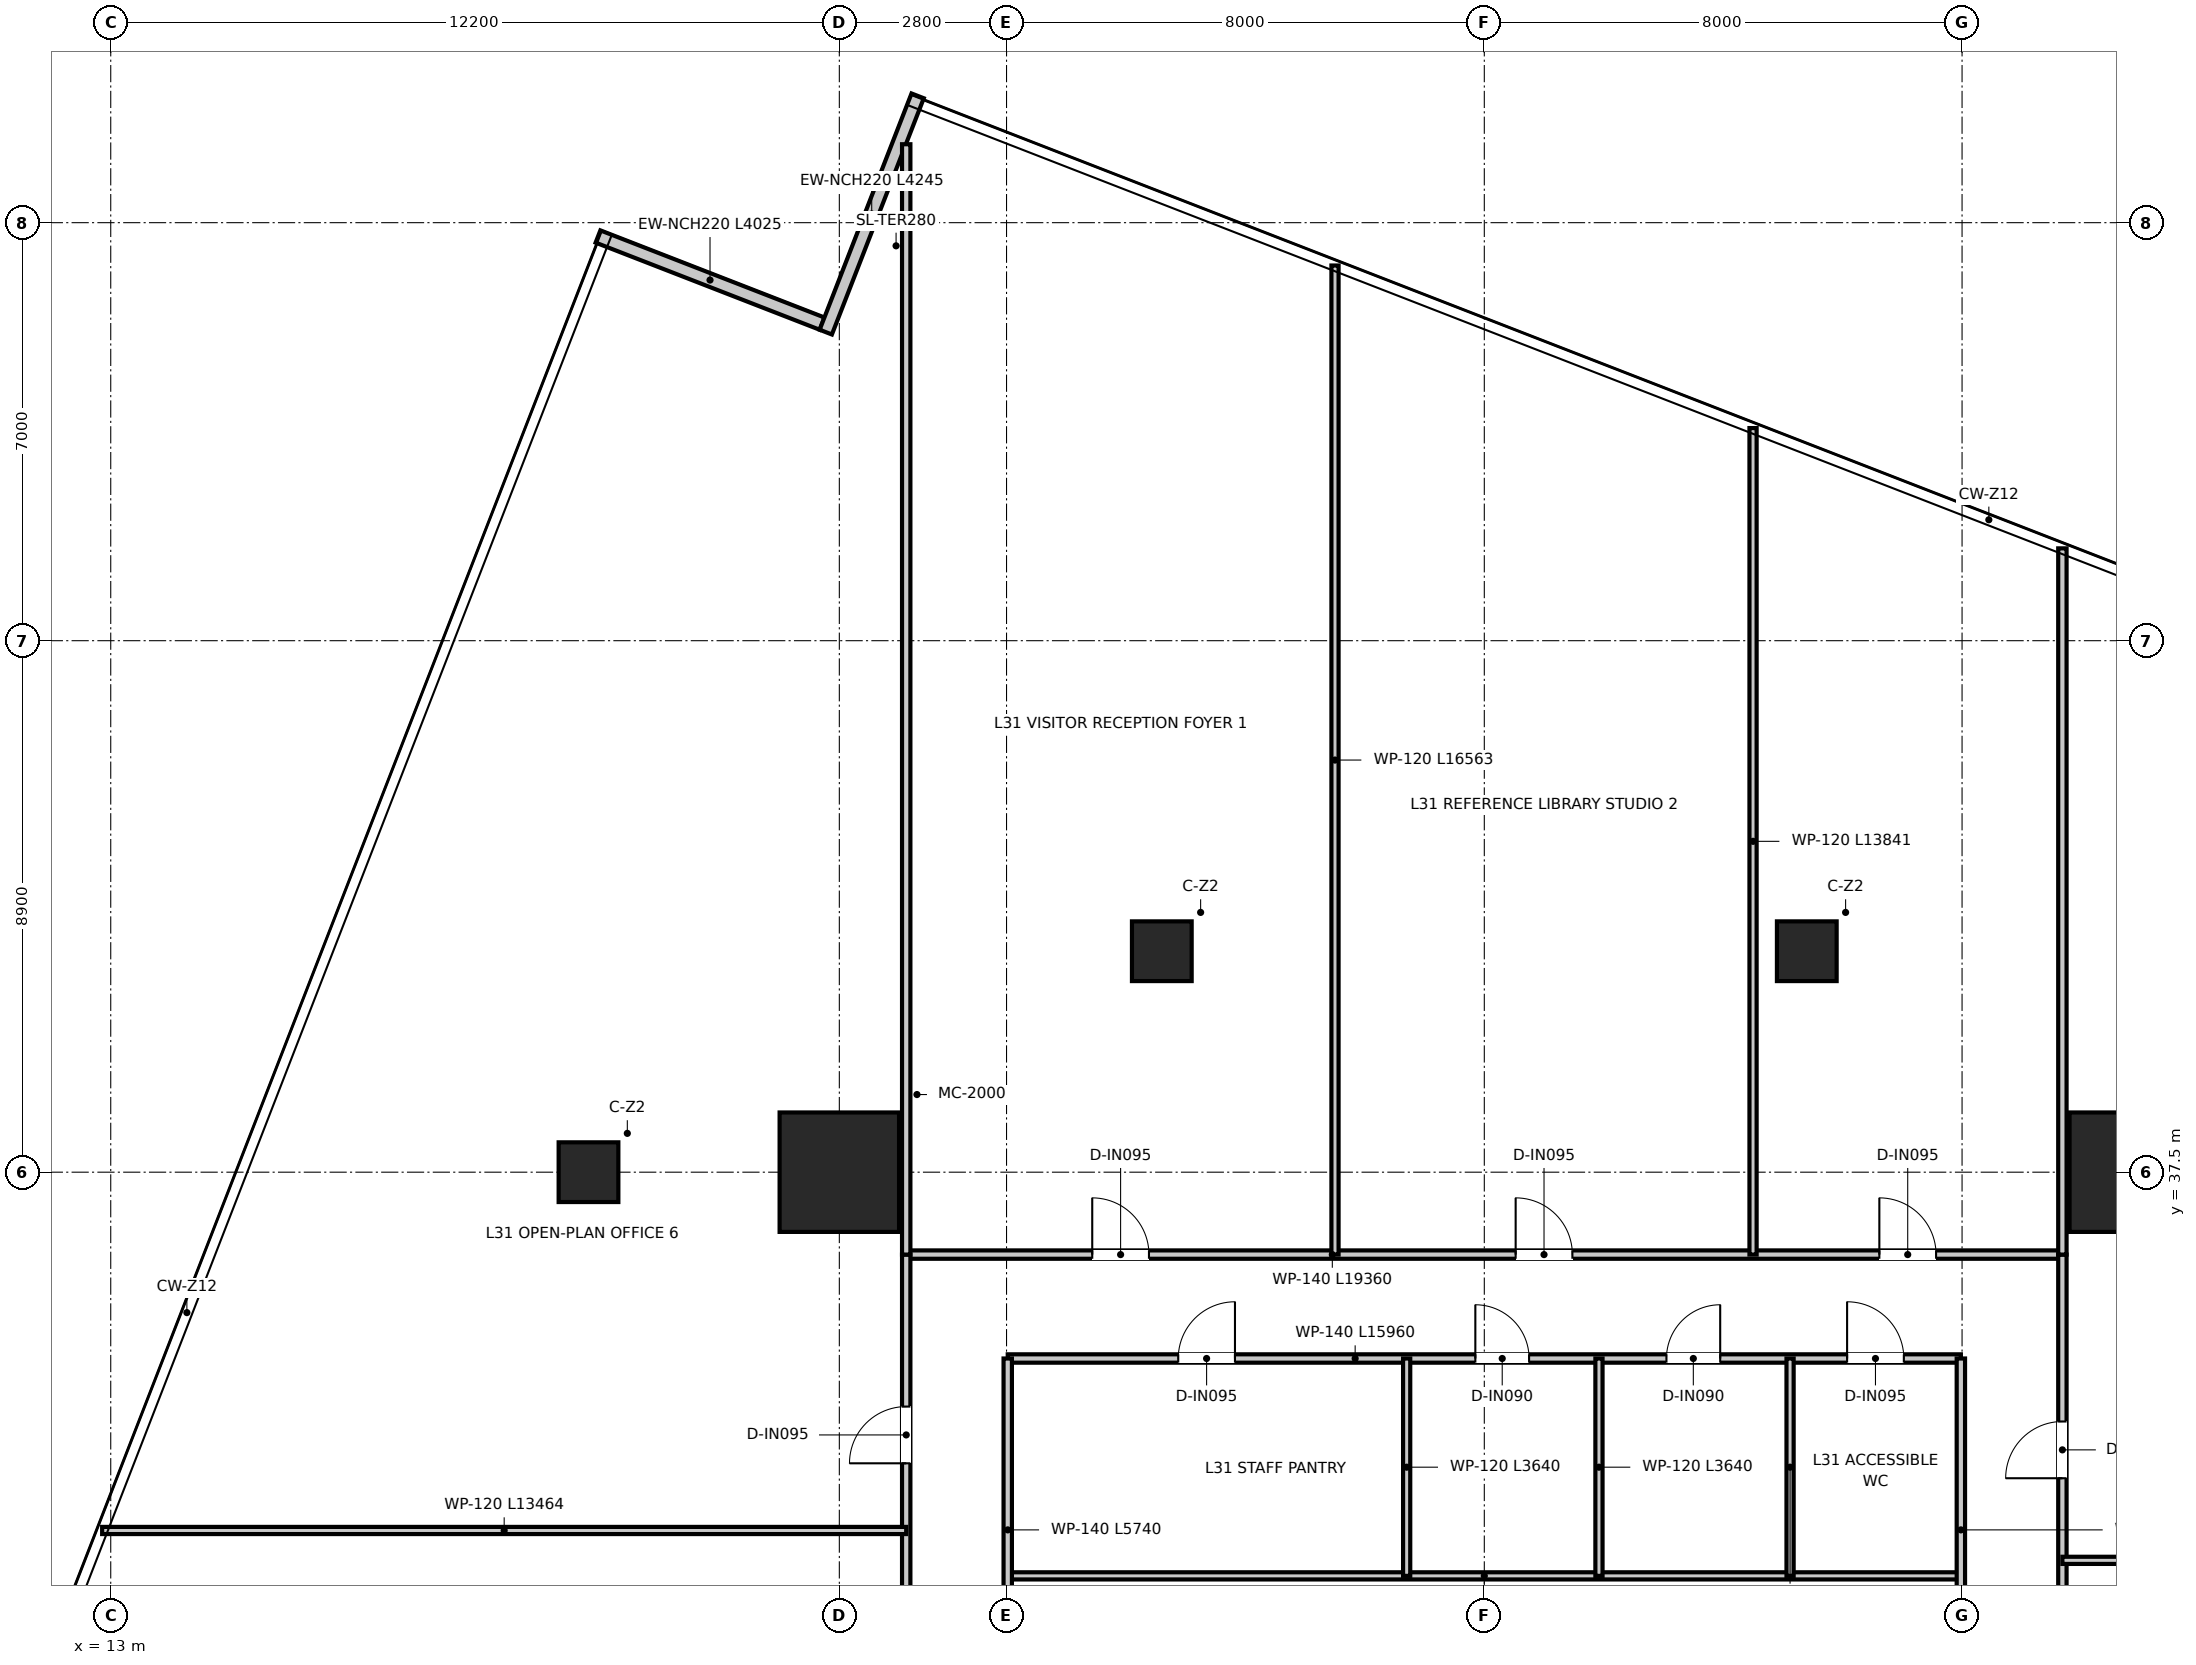
"""IFC4 building model, lengths in metres.
Left out: names, types, materials, properties, quantities, classifications, styles, units other than length and angle.
Written with IfcOpenShell. Run it as: python <this file> out.ifc"""

import sys

from ifc_helpers import new_model, si_unit, direction, frame, frame_2d, origin, origin_2d, place, context, subcontext, project, spatial, rectangle, extrude, source, transform, mapped, element, fill, save


model = new_model("IFC4")
c1 = context("Model", 3, precision=1e-05, world=origin(), true_north=direction((0.0, 1.0)))
c2 = subcontext(c1, "Body", "Model", "MODEL_VIEW")
j1 = project(units=[si_unit("LENGTHUNIT", "METRE"), si_unit("PLANEANGLEUNIT", "RADIAN")], contexts=[c1])
p1 = place(None, origin())
s1 = spatial("IfcSite", under=j1, at=p1, CompositionType="ELEMENT")
p2 = place(p1, origin())
s2 = spatial("IfcBuilding", under=s1, at=p2, CompositionType="ELEMENT")
p3 = place(p2, frame((0.0, 0.0, 129.55)))
s3 = spatial("IfcBuildingStorey", under=s2, at=p3, CompositionType="ELEMENT", Elevation=129.55)
m1 = source(origin(), c2, "Body", "SweptSolid", [
    extrude(rectangle(XDim=2.0, YDim=2.0, at=origin_2d()), origin(), (0.0, 0.0, 1.0), 3.95),
])
for number, where, z_axis, x_axis in (
    (1, (46.8, 37.5, 0.0), (0.0, 0.0, 1.0), (1.0, 0.0, 0.0)),
    (2, (25.2, 37.5, 0.0), (0.0, 0.0, 1.0), (1.0, 0.0, 0.0)),
):
    element("IfcColumn", number, at=place(p3, frame(where, z_axis=z_axis, x_axis=x_axis)), inside=s3, PredefinedType="USERDEFINED", context=c2, shape_type="MappedRepresentation", body=[
        mapped(m1, transform((0.0, 0.0, 0.0), x_axis=(1.0, 0.0, 0.0), y_axis=(0.0, 1.0, 0.0), z_axis=(0.0, 0.0, 1.0), scale=1.0)),
    ])
m2 = source(origin(), c2, "Body", "SweptSolid", [
    extrude(rectangle(XDim=1.0, YDim=1.0, at=origin_2d()), origin(), (0.0, 0.0, 1.0), 3.95),
])
for number, where, z_axis, x_axis in (
    (3, (21.0, 37.5, 0.0), (0.0, 0.0, 1.0), (1.0, 0.0, 0.0)),
    (4, (30.6, 41.2, 0.0), (0.0, 0.0, 1.0), (1.0, 0.0, 0.0)),
    (5, (41.4, 41.2, 0.0), (0.0, 0.0, 1.0), (1.0, 0.0, 0.0)),
):
    element("IfcColumn", number, at=place(p3, frame(where, z_axis=z_axis, x_axis=x_axis)), inside=s3, PredefinedType="COLUMN", context=c2, shape_type="MappedRepresentation", body=[
        mapped(m2, transform((0.0, 0.0, 0.0), x_axis=(1.0, 0.0, 0.0), y_axis=(0.0, 1.0, 0.0), z_axis=(0.0, 0.0, 1.0), scale=1.0)),
    ])
p4 = place(p3, frame((24.91, 51.71, 0.0), z_axis=(0.0, 0.0, 1.0), x_axis=(-0.932010363197, 0.362431625129, 0.0)))
e6 = element("IfcWall", 6, at=p4, inside=s3, PredefinedType="ELEMENTEDWALL", context=c2, shape_type="SweptSolid", body=[
    extrude(rectangle(XDim=4.025, YDim=0.22, at=frame_2d((2.012, 0.0))), origin(), (0.0, 0.0, 1.0), 3.67),
])
p5 = place(p3, frame((26.512, 55.524, 0.0), z_axis=(0.0, 0.0, 1.0), x_axis=(-0.362449036596, -0.932003592198, 0.0)))
e7 = element("IfcWall", 7, at=p5, inside=s3, PredefinedType="ELEMENTEDWALL", context=c2, shape_type="SweptSolid", body=[
    extrude(rectangle(XDim=4.245, YDim=0.22, at=frame_2d((2.123, 0.0))), origin(), (0.0, 0.0, 1.0), 3.67),
])
p6 = place(p3, frame((28.02, 30.74, 0.0), z_axis=(0.0, 0.0, 1.0), x_axis=(1.0, 0.0, 0.0)))
e8 = element("IfcWall", 8, at=p6, inside=s3, PredefinedType="PARTITIONING", context=c2, shape_type="SweptSolid", body=[
    extrude(rectangle(XDim=15.96, YDim=0.12, at=frame_2d((7.98, 0.0))), origin(), (0.0, 0.0, 1.0), 3.08),
])
p7 = place(p3, frame((28.02, 34.38, 0.0), z_axis=(0.0, 0.0, 1.0), x_axis=(1.0, 0.0, 0.0)))
e9 = element("IfcWall", 9, at=p7, inside=s3, PredefinedType="PARTITIONING", context=c2, shape_type="SweptSolid", body=[
    extrude(rectangle(XDim=15.96, YDim=0.14, at=frame_2d((7.98, 0.0))), origin(), (0.0, 0.0, 1.0), 3.08),
])
p8 = place(p7, frame((7.83, 0.0, 0.0)))
e10 = element("IfcOpeningElement", 10, at=p8, cuts=e9, PredefinedType="OPENING", context=c2, shape_type="SweptSolid", body=[
    extrude(rectangle(XDim=0.9, YDim=2.1, at=frame_2d((0.45, 1.05))), frame((0.0, 0.08, 0.0), z_axis=(0.0, -1.0, 0.0), x_axis=(1.0, 0.0, 0.0)), (0.0, 0.0, 1.0), 0.16),
])
p9 = place(p7, frame((11.03, 0.0, 0.0)))
e11 = element("IfcOpeningElement", 11, at=p9, cuts=e9, PredefinedType="OPENING", context=c2, shape_type="SweptSolid", body=[
    extrude(rectangle(XDim=0.9, YDim=2.1, at=frame_2d((0.45, 1.05))), frame((0.0, 0.08, 0.0), z_axis=(0.0, -1.0, 0.0), x_axis=(1.0, 0.0, 0.0)), (0.0, 0.0, 1.0), 0.16),
])
p10 = place(p7, frame((14.055, 0.0, 0.0)))
e12 = element("IfcOpeningElement", 12, at=p10, cuts=e9, PredefinedType="OPENING", context=c2, shape_type="SweptSolid", body=[
    extrude(rectangle(XDim=0.95, YDim=2.1, at=frame_2d((0.475, 1.05))), frame((0.0, 0.08, 0.0), z_axis=(0.0, -1.0, 0.0), x_axis=(1.0, 0.0, 0.0)), (0.0, 0.0, 1.0), 0.16),
])
p11 = place(p7, frame((2.855, 0.0, 0.0)))
e13 = element("IfcOpeningElement", 13, at=p11, cuts=e9, PredefinedType="OPENING", context=c2, shape_type="SweptSolid", body=[
    extrude(rectangle(XDim=0.95, YDim=2.1, at=frame_2d((0.475, 1.05))), frame((0.0, 0.08, 0.0), z_axis=(0.0, -1.0, 0.0), x_axis=(1.0, 0.0, 0.0)), (0.0, 0.0, 1.0), 0.16),
])
for number, where, z_axis, x_axis in (
    (14, (28.02, 28.64, 0.0), (0.0, 0.0, 1.0), (0.0, 1.0, 0.0)),
    (15, (43.98, 28.64, 0.0), (0.0, 0.0, 1.0), (0.0, 1.0, 0.0)),
):
    element("IfcWall", number, at=place(p3, frame(where, z_axis=z_axis, x_axis=x_axis)), inside=s3, PredefinedType="PARTITIONING", context=c2, shape_type="SweptSolid", body=[
        extrude(rectangle(XDim=5.74, YDim=0.14, at=frame_2d((2.87, 0.0))), origin(), (0.0, 0.0, 1.0), 3.27),
    ])
for number, where, z_axis, x_axis in (
    (16, (37.92, 30.74, 0.0), (0.0, 0.0, 1.0), (0.0, 1.0, 0.0)),
    (17, (41.12, 30.74, 0.0), (0.0, 0.0, 1.0), (0.0, 1.0, 0.0)),
    (18, (34.7, 30.74, 0.0), (0.0, 0.0, 1.0), (0.0, 1.0, 0.0)),
):
    element("IfcWall", number, at=place(p3, frame(where, z_axis=z_axis, x_axis=x_axis)), inside=s3, PredefinedType="PARTITIONING", context=c2, shape_type="SweptSolid", body=[
        extrude(rectangle(XDim=3.64, YDim=0.12, at=frame_2d((1.82, 0.0))), origin(), (0.0, 0.0, 1.0), 3.17),
    ])
p12 = place(p3, frame((26.32, 36.12, 0.0), z_axis=(0.0, 0.0, 1.0), x_axis=(1.0, 0.0, 0.0)))
e19 = element("IfcWall", 19, at=p12, inside=s3, PredefinedType="PARTITIONING", context=c2, shape_type="SweptSolid", body=[
    extrude(rectangle(XDim=19.36, YDim=0.14, at=frame_2d((9.68, 0.0))), origin(), (0.0, 0.0, 1.0), 3.08),
])
p13 = place(p12, frame((3.115, 0.0, 0.0)))
e20 = element("IfcOpeningElement", 20, at=p13, cuts=e19, PredefinedType="OPENING", context=c2, shape_type="SweptSolid", body=[
    extrude(rectangle(XDim=0.95, YDim=2.1, at=frame_2d((0.475, 1.05))), frame((0.0, 0.08, 0.0), z_axis=(0.0, -1.0, 0.0), x_axis=(1.0, 0.0, 0.0)), (0.0, 0.0, 1.0), 0.16),
])
p14 = place(p12, frame((10.205, 0.0, 0.0)))
e21 = element("IfcOpeningElement", 21, at=p14, cuts=e19, PredefinedType="OPENING", context=c2, shape_type="SweptSolid", body=[
    extrude(rectangle(XDim=0.95, YDim=2.1, at=frame_2d((0.475, 1.05))), frame((0.0, 0.08, 0.0), z_axis=(0.0, -1.0, 0.0), x_axis=(1.0, 0.0, 0.0)), (0.0, 0.0, 1.0), 0.16),
])
p15 = place(p12, frame((16.295, 0.0, 0.0)))
e22 = element("IfcOpeningElement", 22, at=p15, cuts=e19, PredefinedType="OPENING", context=c2, shape_type="SweptSolid", body=[
    extrude(rectangle(XDim=0.95, YDim=2.1, at=frame_2d((0.475, 1.05))), frame((0.0, 0.08, 0.0), z_axis=(0.0, -1.0, 0.0), x_axis=(1.0, 0.0, 0.0)), (0.0, 0.0, 1.0), 0.16),
])
p16 = place(p3, frame((26.32, 10.5, 0.0), z_axis=(0.0, 0.0, 1.0), x_axis=(0.0, 1.0, 0.0)))
e23 = element("IfcWall", 23, at=p16, inside=s3, PredefinedType="PARTITIONING", context=c2, shape_type="SweptSolid", body=[
    extrude(rectangle(XDim=25.62, YDim=0.14, at=frame_2d((12.81, 0.0))), origin(), (0.0, 0.0, 1.0), 2.97),
])
p17 = place(p16, frame((9.525, 0.0, 0.0)))
e24 = element("IfcOpeningElement", 24, at=p17, cuts=e23, PredefinedType="OPENING", context=c2, shape_type="SweptSolid", body=[
    extrude(rectangle(XDim=0.95, YDim=2.1, at=frame_2d((0.475, 1.05))), frame((0.0, 0.08, 0.0), z_axis=(0.0, -1.0, 0.0), x_axis=(1.0, 0.0, 0.0)), (0.0, 0.0, 1.0), 0.16),
])
p18 = place(p16, frame((16.525, 0.0, 0.0)))
e25 = element("IfcOpeningElement", 25, at=p18, cuts=e23, PredefinedType="OPENING", context=c2, shape_type="SweptSolid", body=[
    extrude(rectangle(XDim=0.95, YDim=2.1, at=frame_2d((0.475, 1.05))), frame((0.0, 0.08, 0.0), z_axis=(0.0, -1.0, 0.0), x_axis=(1.0, 0.0, 0.0)), (0.0, 0.0, 1.0), 0.16),
])
p19 = place(p16, frame((22.125, 0.0, 0.0)))
e26 = element("IfcOpeningElement", 26, at=p19, cuts=e23, PredefinedType="OPENING", context=c2, shape_type="SweptSolid", body=[
    extrude(rectangle(XDim=0.95, YDim=2.1, at=frame_2d((0.475, 1.05))), frame((0.0, 0.08, 0.0), z_axis=(0.0, -1.0, 0.0), x_axis=(1.0, 0.0, 0.0)), (0.0, 0.0, 1.0), 0.16),
])
p20 = place(p3, frame((45.68, 10.5, 0.0), z_axis=(0.0, 0.0, 1.0), x_axis=(0.0, 1.0, 0.0)))
e27 = element("IfcWall", 27, at=p20, inside=s3, PredefinedType="PARTITIONING", context=c2, shape_type="SweptSolid", body=[
    extrude(rectangle(XDim=25.62, YDim=0.14, at=frame_2d((12.81, 0.0))), origin(), (0.0, 0.0, 1.0), 2.97),
])
p21 = place(p20, frame((7.775, 0.0, 0.0)))
e28 = element("IfcOpeningElement", 28, at=p21, cuts=e27, PredefinedType="OPENING", context=c2, shape_type="SweptSolid", body=[
    extrude(rectangle(XDim=0.95, YDim=2.1, at=frame_2d((0.475, 1.05))), frame((0.0, 0.08, 0.0), z_axis=(0.0, -1.0, 0.0), x_axis=(1.0, 0.0, 0.0)), (0.0, 0.0, 1.0), 0.16),
])
p22 = place(p20, frame((11.775, 0.0, 0.0)))
e29 = element("IfcOpeningElement", 29, at=p22, cuts=e27, PredefinedType="OPENING", context=c2, shape_type="SweptSolid", body=[
    extrude(rectangle(XDim=0.95, YDim=2.1, at=frame_2d((0.475, 1.05))), frame((0.0, 0.08, 0.0), z_axis=(0.0, -1.0, 0.0), x_axis=(1.0, 0.0, 0.0)), (0.0, 0.0, 1.0), 0.16),
])
p23 = place(p20, frame((17.275, 0.0, 0.0)))
e30 = element("IfcOpeningElement", 30, at=p23, cuts=e27, PredefinedType="OPENING", context=c2, shape_type="SweptSolid", body=[
    extrude(rectangle(XDim=0.95, YDim=2.1, at=frame_2d((0.475, 1.05))), frame((0.0, 0.08, 0.0), z_axis=(0.0, -1.0, 0.0), x_axis=(1.0, 0.0, 0.0)), (0.0, 0.0, 1.0), 0.16),
])
p24 = place(p20, frame((21.875, 0.0, 0.0)))
e31 = element("IfcOpeningElement", 31, at=p24, cuts=e27, PredefinedType="OPENING", context=c2, shape_type="SweptSolid", body=[
    extrude(rectangle(XDim=0.95, YDim=2.1, at=frame_2d((0.475, 1.05))), frame((0.0, 0.08, 0.0), z_axis=(0.0, -1.0, 0.0), x_axis=(1.0, 0.0, 0.0)), (0.0, 0.0, 1.0), 0.16),
])
p25 = place(p3, frame((26.32, 36.12, 0.0), z_axis=(0.0, 0.0, 1.0), x_axis=(0.0, 1.0, 0.0)))
e32 = element("IfcWall", 32, at=p25, inside=s3, PredefinedType="PARTITIONING", context=c2, shape_type="SweptSolid", body=[
    extrude(rectangle(XDim=18.594, YDim=0.14, at=frame_2d((9.297, 0.0))), origin(), (0.0, 0.0, 1.0), 2.97),
])
p26 = place(p3, frame((45.68, 36.12, 0.0), z_axis=(0.0, 0.0, 1.0), x_axis=(0.0, 1.0, 0.0)))
e33 = element("IfcWall", 33, at=p26, inside=s3, PredefinedType="PARTITIONING", context=c2, shape_type="SweptSolid", body=[
    extrude(rectangle(XDim=11.826, YDim=0.14, at=frame_2d((5.913, 0.0))), origin(), (0.0, 0.0, 1.0), 2.97),
])
p27 = place(p3, frame((33.5, 36.12, 0.0), z_axis=(0.0, 0.0, 1.0), x_axis=(0.0, 1.0, 0.0)))
e34 = element("IfcWall", 34, at=p27, inside=s3, PredefinedType="PARTITIONING", context=c2, shape_type="SweptSolid", body=[
    extrude(rectangle(XDim=16.562, YDim=0.12, at=frame_2d((8.281, 0.0))), origin(), (0.0, 0.0, 1.0), 2.97),
])
p28 = place(p3, frame((40.5, 36.12, 0.0), z_axis=(0.0, 0.0, 1.0), x_axis=(0.0, 1.0, 0.0)))
e35 = element("IfcWall", 35, at=p28, inside=s3, PredefinedType="PARTITIONING", context=c2, shape_type="SweptSolid", body=[
    extrude(rectangle(XDim=13.841, YDim=0.12, at=frame_2d((6.92, 0.0))), origin(), (0.0, 0.0, 1.0), 2.97),
])
p29 = place(p3, frame((12.856, 31.5, 0.0), z_axis=(0.0, 0.0, 1.0), x_axis=(1.0, 0.0, 0.0)))
e36 = element("IfcWall", 36, at=p29, inside=s3, PredefinedType="PARTITIONING", context=c2, shape_type="SweptSolid", body=[
    extrude(rectangle(XDim=13.464, YDim=0.12, at=frame_2d((6.732, 0.0))), origin(), (0.0, 0.0, 1.0), 2.97),
])
p30 = place(p3, frame((45.68, 31.0, 0.0), z_axis=(0.0, 0.0, 1.0), x_axis=(1.0, 0.0, 0.0)))
e37 = element("IfcWall", 37, at=p30, inside=s3, PredefinedType="PARTITIONING", context=c2, shape_type="SweptSolid", body=[
    extrude(rectangle(XDim=17.003, YDim=0.12, at=frame_2d((8.501, 0.0))), origin(), (0.0, 0.0, 1.0), 2.97),
])
p31 = place(p8, origin())
e38 = element("IfcDoor", 38, at=p31, inside=s3, OperationType="SINGLE_SWING_LEFT", PredefinedType="DOOR", context=c2, shape_type="SweptSolid", body=[
    extrude(rectangle(XDim=0.9, YDim=2.1, at=frame_2d((0.45, 1.05))), frame((0.0, 0.025, 0.0), z_axis=(0.0, -1.0, 0.0), x_axis=(1.0, 0.0, 0.0)), (0.0, 0.0, 1.0), 0.05),
])
fill(e10, e38)
p32 = place(p9, origin())
e39 = element("IfcDoor", 39, at=p32, inside=s3, OperationType="SINGLE_SWING_RIGHT", PredefinedType="DOOR", context=c2, shape_type="SweptSolid", body=[
    extrude(rectangle(XDim=0.9, YDim=2.1, at=frame_2d((0.45, 1.05))), frame((0.0, 0.025, 0.0), z_axis=(0.0, -1.0, 0.0), x_axis=(1.0, 0.0, 0.0)), (0.0, 0.0, 1.0), 0.05),
])
fill(e11, e39)
p33 = place(p10, origin())
e40 = element("IfcDoor", 40, at=p33, inside=s3, OperationType="SINGLE_SWING_LEFT", PredefinedType="DOOR", context=c2, shape_type="SweptSolid", body=[
    extrude(rectangle(XDim=0.95, YDim=2.1, at=frame_2d((0.475, 1.05))), frame((0.0, 0.025, 0.0), z_axis=(0.0, -1.0, 0.0), x_axis=(1.0, 0.0, 0.0)), (0.0, 0.0, 1.0), 0.05),
])
fill(e12, e40)
p34 = place(p11, origin())
e41 = element("IfcDoor", 41, at=p34, inside=s3, OperationType="SINGLE_SWING_RIGHT", PredefinedType="DOOR", context=c2, shape_type="SweptSolid", body=[
    extrude(rectangle(XDim=0.95, YDim=2.1, at=frame_2d((0.475, 1.05))), frame((0.0, 0.025, 0.0), z_axis=(0.0, -1.0, 0.0), x_axis=(1.0, 0.0, 0.0)), (0.0, 0.0, 1.0), 0.05),
])
fill(e13, e41)
p35 = place(p13, origin())
e42 = element("IfcDoor", 42, at=p35, inside=s3, OperationType="SINGLE_SWING_LEFT", PredefinedType="DOOR", context=c2, shape_type="SweptSolid", body=[
    extrude(rectangle(XDim=0.95, YDim=2.1, at=frame_2d((0.475, 1.05))), frame((0.0, 0.025, 0.0), z_axis=(0.0, -1.0, 0.0), x_axis=(1.0, 0.0, 0.0)), (0.0, 0.0, 1.0), 0.05),
])
fill(e20, e42)
p36 = place(p14, origin())
e43 = element("IfcDoor", 43, at=p36, inside=s3, OperationType="SINGLE_SWING_LEFT", PredefinedType="DOOR", context=c2, shape_type="SweptSolid", body=[
    extrude(rectangle(XDim=0.95, YDim=2.1, at=frame_2d((0.475, 1.05))), frame((0.0, 0.025, 0.0), z_axis=(0.0, -1.0, 0.0), x_axis=(1.0, 0.0, 0.0)), (0.0, 0.0, 1.0), 0.05),
])
fill(e21, e43)
p37 = place(p15, origin())
e44 = element("IfcDoor", 44, at=p37, inside=s3, OperationType="SINGLE_SWING_LEFT", PredefinedType="DOOR", context=c2, shape_type="SweptSolid", body=[
    extrude(rectangle(XDim=0.95, YDim=2.1, at=frame_2d((0.475, 1.05))), frame((0.0, 0.025, 0.0), z_axis=(0.0, -1.0, 0.0), x_axis=(1.0, 0.0, 0.0)), (0.0, 0.0, 1.0), 0.05),
])
fill(e22, e44)
p38 = place(p19, origin())
e45 = element("IfcDoor", 45, at=p38, inside=s3, OperationType="SINGLE_SWING_LEFT", PredefinedType="DOOR", context=c2, shape_type="SweptSolid", body=[
    extrude(rectangle(XDim=0.95, YDim=2.1, at=frame_2d((0.475, 1.05))), frame((0.0, 0.025, 0.0), z_axis=(0.0, -1.0, 0.0), x_axis=(1.0, 0.0, 0.0)), (0.0, 0.0, 1.0), 0.05),
])
fill(e26, e45)
p39 = place(p24, origin())
e46 = element("IfcDoor", 46, at=p39, inside=s3, OperationType="SINGLE_SWING_LEFT", PredefinedType="DOOR", context=c2, shape_type="SweptSolid", body=[
    extrude(rectangle(XDim=0.95, YDim=2.1, at=frame_2d((0.475, 1.05))), frame((0.0, 0.025, 0.0), z_axis=(0.0, -1.0, 0.0), x_axis=(1.0, 0.0, 0.0)), (0.0, 0.0, 1.0), 0.05),
])
fill(e31, e46)
save(model, sys.argv[1])
